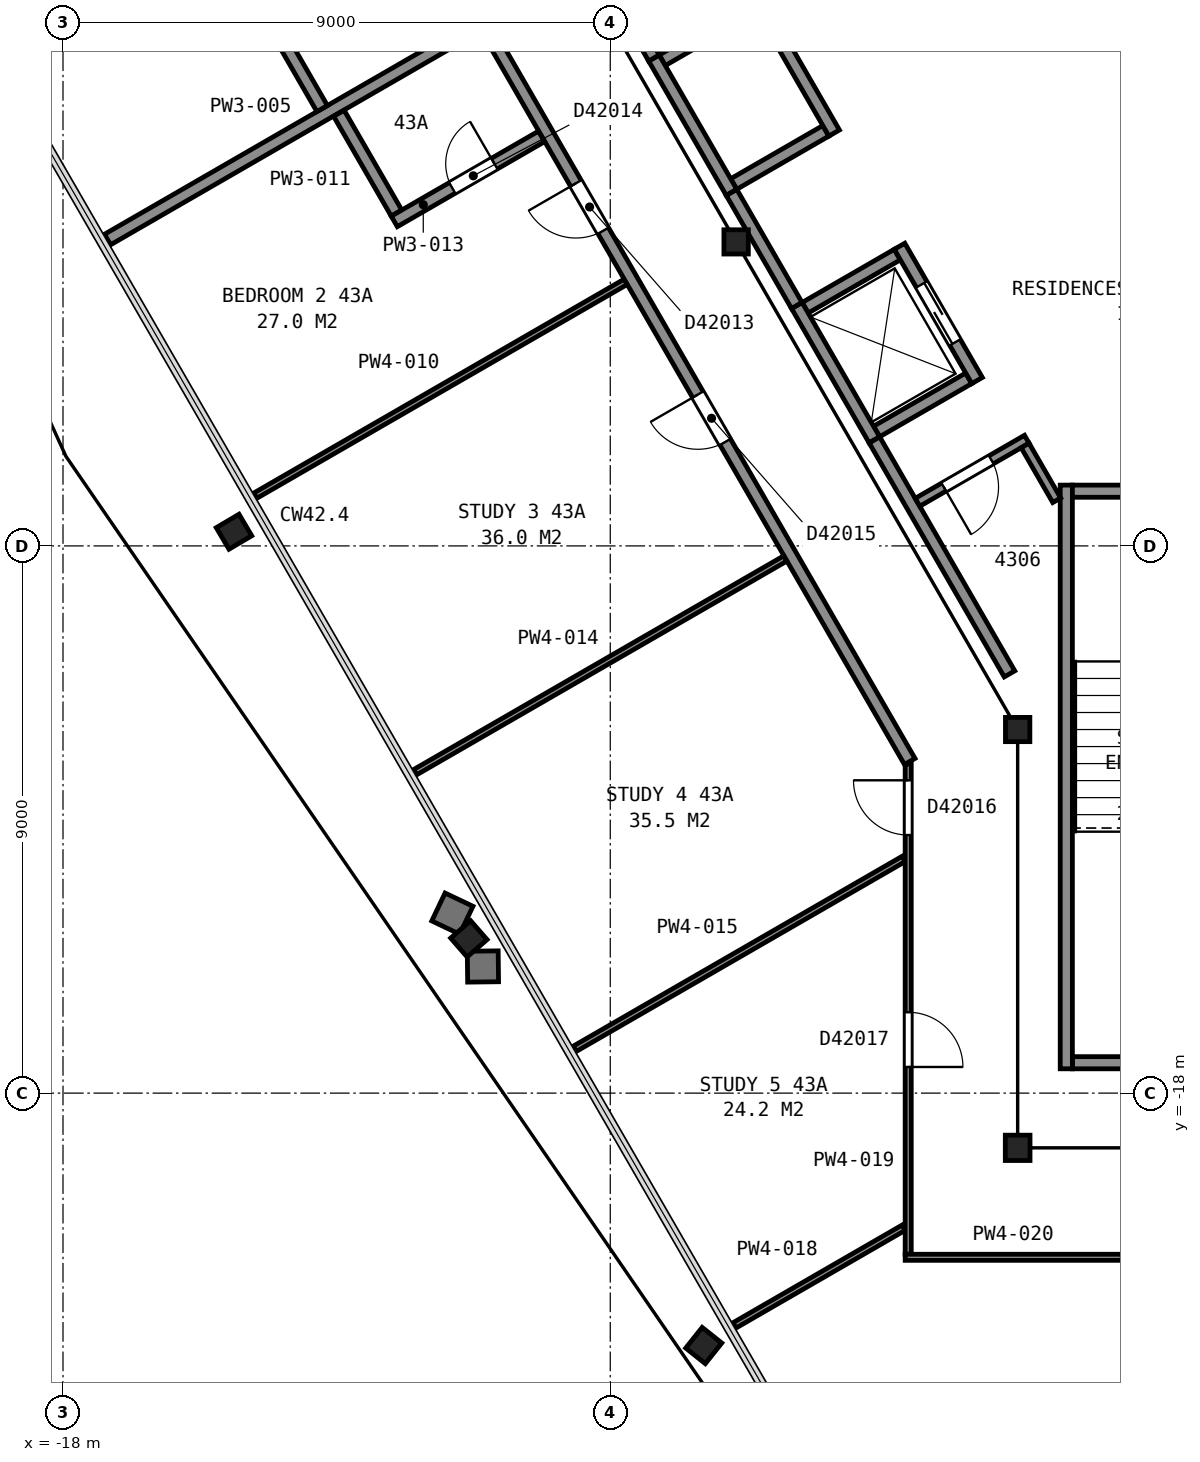
"""IFC4 building model, lengths in metres.
Left out: names, types, materials, properties, quantities, classifications, styles, units other than length and angle.
Written with IfcOpenShell. Run it as: python <this file> out.ifc"""

import sys

from ifc_helpers import new_model, si_unit, direction, frame, frame_2d, origin, origin_2d, place, context, subcontext, project, spatial, rectangle, i_section, extrude, element, fill, save


model = new_model("IFC4")
c1 = context("Model", 3, precision=1e-05, world=origin(), true_north=direction((0.0, 1.0)))
c2 = subcontext(c1, "Body", "Model", "MODEL_VIEW")
j1 = project(units=[si_unit("LENGTHUNIT", "METRE"), si_unit("PLANEANGLEUNIT", "RADIAN")], contexts=[c1])
p1 = place(None, origin())
s1 = spatial("IfcSite", under=j1, at=p1, CompositionType="ELEMENT")
p2 = place(p1, origin())
s2 = spatial("IfcBuilding", under=s1, at=p2, CompositionType="ELEMENT")
p3 = place(p2, frame((0.0, 0.0, 174.7)))
s3 = spatial("IfcBuildingStorey", under=s2, at=p3, CompositionType="ELEMENT", Elevation=174.7)
p4 = place(p3, frame((-14.996, -8.653, 0.035), z_axis=(-0.16191056894, -0.095587349349, 0.982164968989), x_axis=(-0.50013253787, 0.865946936972, 0.001829457054)))
e1 = element("IfcColumn", 1, at=p4, inside=s3, PredefinedType="COLUMN", context=c2, shape_type="SweptSolid", body=[
    extrude(i_section(OverallWidth=0.411, OverallDepth=0.434, WebThickness=0.036, FlangeThickness=0.057, FilletRadius=0.015, at=origin_2d()), origin(), (0.0, 0.0, 1.0), 3.696),
])
p5 = place(p3, frame((-11.155, -15.314, 0.035), z_axis=(-0.143292975225, -0.124737525438, 0.981787997991), x_axis=(-0.499725907096, 0.865392394927, 0.037013789052)))
e2 = element("IfcColumn", 2, at=p5, inside=s3, PredefinedType="COLUMN", context=c2, shape_type="SweptSolid", body=[
    extrude(i_section(OverallWidth=0.411, OverallDepth=0.434, WebThickness=0.036, FlangeThickness=0.057, FilletRadius=0.015, at=origin_2d()), origin(), (0.0, 0.0, 1.0), 3.697),
])
p6 = place(p3, frame((-7.315, -21.966, 0.04), z_axis=(-0.124429833743, -0.156280699311, 0.979843640331), x_axis=(-0.498834724262, 0.86349979086, 0.074377611249)))
e3 = element("IfcColumn", 3, at=p6, inside=s3, PredefinedType="COLUMN", context=c2, shape_type="SweptSolid", body=[
    extrude(i_section(OverallWidth=0.411, OverallDepth=0.434, WebThickness=0.036, FlangeThickness=0.057, FilletRadius=0.015, at=origin_2d()), origin(), (0.0, 0.0, 1.0), 3.695),
])
for number, where, z_axis, x_axis in (
    (4, (-6.93, -4.0, 0.0), (0.0, 0.0, 1.0), (1.0, 0.0, 0.0)),
    (5, (-2.3, -12.02, 0.0), (0.0, 0.0, 1.0), (1.0, 0.0, 0.0)),
):
    element("IfcColumn", number, at=place(p3, frame(where, z_axis=z_axis, x_axis=x_axis)), inside=s3, PredefinedType="COLUMN", context=c2, shape_type="SweptSolid", body=[
        extrude(i_section(OverallWidth=0.401, OverallDepth=0.399, WebThickness=0.025, FlangeThickness=0.04, FilletRadius=0.015, at=origin_2d()), origin(), (0.0, 0.0, 1.0), 3.7),
    ])
p7 = place(p3, frame((-2.3, -18.9, 0.0), z_axis=(0.0, 0.0, 1.0), x_axis=(-1.0, 0.0, 0.0)))
e6 = element("IfcColumn", 6, at=p7, inside=s3, PredefinedType="COLUMN", context=c2, shape_type="SweptSolid", body=[
    extrude(i_section(OverallWidth=0.406, OverallDepth=0.417, WebThickness=0.03, FlangeThickness=0.048, FilletRadius=0.015, at=origin_2d()), origin(), (0.0, 0.0, 1.0), 3.7),
])
p8 = place(p3, frame((-1.4, -17.5, 0.0), z_axis=(0.0, 0.0, 1.0), x_axis=(1.0, 0.0, 0.0)))
e7 = element("IfcWall", 7, at=p8, inside=s3, PredefinedType="PARTITIONING", context=c2, shape_type="SweptSolid", body=[
    extrude(rectangle(XDim=2.8, YDim=0.2, at=frame_2d((1.4, 0.0))), origin(), (0.0, 0.0, 1.0), 3.45),
])
p9 = place(p8, frame((0.85, 0.0, 0.0)))
e8 = element("IfcOpeningElement", 8, at=p9, cuts=e7, PredefinedType="OPENING", context=c2, shape_type="SweptSolid", body=[
    extrude(rectangle(XDim=1.1, YDim=2.1, at=frame_2d((0.55, 1.05))), frame((0.0, 0.11, 0.0), z_axis=(0.0, -1.0, 0.0), x_axis=(1.0, 0.0, 0.0)), (0.0, 0.0, 1.0), 0.22),
])
p10 = place(p3, frame((-1.5, -8.0, 0.0), z_axis=(0.0, 0.0, 1.0), x_axis=(0.0, -1.0, 0.0)))
e9 = element("IfcWall", 9, at=p10, inside=s3, PredefinedType="PARTITIONING", context=c2, shape_type="SweptSolid", body=[
    extrude(rectangle(XDim=9.6, YDim=0.2, at=frame_2d((4.8, 0.0))), origin(), (0.0, 0.0, 1.0), 3.45),
])
p11 = place(p3, frame((-1.4, -8.1, 0.0), z_axis=(0.0, 0.0, 1.0), x_axis=(1.0, 0.0, 0.0)))
e10 = element("IfcWall", 10, at=p11, inside=s3, PredefinedType="PARTITIONING", context=c2, shape_type="SweptSolid", body=[
    extrude(rectangle(XDim=2.8, YDim=0.2, at=frame_2d((1.4, 0.0))), origin(), (0.0, 0.0, 1.0), 3.45),
])
for number, where, z_axis, x_axis in (
    (11, (-4.62, -7.118, 0.0), (0.0, 0.0, 1.0), (0.866, 0.5, 0.0)),
    (12, (-5.795, -5.083, 0.0), (0.0, 0.0, 1.0), (0.866, 0.5, 0.0)),
    (13, (-6.97, -3.048, 0.0), (0.0, 0.0, 1.0), (0.866, 0.5, 0.0)),
):
    element("IfcWall", number, at=place(p3, frame(where, z_axis=z_axis, x_axis=x_axis)), inside=s3, PredefinedType="PARTITIONING", context=c2, shape_type="SweptSolid", body=[
        extrude(rectangle(XDim=1.75, YDim=0.2, at=frame_2d((0.875, 0.0))), origin(), (0.0, 0.0, 1.0), 3.7),
    ])
p12 = place(p3, frame((-8.145, -1.013, 0.0), z_axis=(0.0, 0.0, 1.0), x_axis=(0.866016494683, 0.500015430699, 0.0)))
e14 = element("IfcWall", 14, at=p12, inside=s3, PredefinedType="PARTITIONING", context=c2, shape_type="SweptSolid", body=[
    extrude(rectangle(XDim=3.15, YDim=0.2, at=frame_2d((1.575, 0.0))), origin(), (0.0, 0.0, 1.0), 3.7),
])
p13 = place(p3, frame((-2.968, -6.28, 0.0), z_axis=(0.0, 0.0, 1.0), x_axis=(-0.499990435942, 0.866030925526, 0.0)))
e15 = element("IfcWall", 15, at=p13, inside=s3, PredefinedType="PARTITIONING", context=c2, shape_type="SweptSolid", body=[
    extrude(rectangle(XDim=2.55, YDim=0.2, at=frame_2d((1.275, 0.0))), origin(), (0.0, 0.0, 1.0), 3.7),
])
p14 = place(p13, frame((0.725, 0.0, 0.0)))
e16 = element("IfcOpeningElement", 16, at=p14, cuts=e15, PredefinedType="OPENING", context=c2, shape_type="SweptSolid", body=[
    extrude(rectangle(XDim=1.1, YDim=2.1, at=frame_2d((0.55, 1.05))), frame((0.0, 0.11, 0.0), z_axis=(0.0, -1.0, 0.0), x_axis=(1.0, 0.0, 0.0)), (0.0, 0.0, 1.0), 0.22),
])
p15 = place(p3, frame((-5.318, -2.21, 0.0), z_axis=(0.0, 0.0, 1.0), x_axis=(-0.499938297808, 0.866061024631, 0.0)))
e17 = element("IfcWall", 17, at=p15, inside=s3, PredefinedType="PARTITIONING", context=c2, shape_type="SweptSolid", body=[
    extrude(rectangle(XDim=2.35, YDim=0.2, at=frame_2d((1.175, 0.0))), origin(), (0.0, 0.0, 1.0), 3.7),
])
for number, where, z_axis, x_axis in (
    (18, (-4.656, -7.255, 0.0), (0.0, 0.0, 1.0), (-0.5, 0.866, 0.0)),
    (19, (-7.006, -3.185, 0.0), (0.0, 0.0, 1.0), (-0.5, 0.866, 0.0)),
):
    element("IfcWall", number, at=place(p3, frame(where, z_axis=z_axis, x_axis=x_axis)), inside=s3, PredefinedType="PARTITIONING", context=c2, shape_type="SweptSolid", body=[
        extrude(rectangle(XDim=2.55, YDim=0.2, at=frame_2d((1.275, 0.0))), origin(), (0.0, 0.0, 1.0), 3.7),
    ])
p16 = place(p3, frame((-11.591, 4.755, 0.0), z_axis=(0.0, 0.0, 1.0), x_axis=(0.500043977787, -0.866000011708, 0.0)))
e20 = element("IfcWall", 20, at=p16, inside=s3, PredefinedType="PARTITIONING", context=c2, shape_type="SweptSolid", body=[
    extrude(rectangle(XDim=6.617, YDim=0.2, at=frame_2d((3.308, 0.0))), origin(), (0.0, 0.0, 1.0), 3.45),
])
p17 = place(p16, frame((3.695, 0.0, 0.0)))
e21 = element("IfcOpeningElement", 21, at=p17, cuts=e20, PredefinedType="OPENING", context=c2, shape_type="SweptSolid", body=[
    extrude(rectangle(XDim=1.8, YDim=2.1, at=frame_2d((0.9, 1.05))), frame((0.0, 0.11, 0.0), z_axis=(0.0, -1.0, 0.0), x_axis=(1.0, 0.0, 0.0)), (0.0, 0.0, 1.0), 0.22),
])
p18 = place(p3, frame((-7.005, -3.187, 0.0), z_axis=(0.0, 0.0, 1.0), x_axis=(0.499689606989, -0.866204535123, 0.0)))
e22 = element("IfcWall", 22, at=p18, inside=s3, PredefinedType="PARTITIONING", context=c2, shape_type="SweptSolid", body=[
    extrude(rectangle(XDim=2.145, YDim=0.2, at=frame_2d((1.072, 0.0))), origin(), (0.0, 0.0, 1.0), 3.45),
])
p19 = place(p3, frame((-4.655, -7.257, 0.0), z_axis=(0.0, 0.0, 1.0), x_axis=(0.499892115999, -0.866087681682, 0.0)))
e23 = element("IfcWall", 23, at=p19, inside=s3, PredefinedType="PARTITIONING", context=c2, shape_type="SweptSolid", body=[
    extrude(rectangle(XDim=4.443, YDim=0.2, at=frame_2d((2.221, 0.0))), origin(), (0.0, 0.0, 1.0), 3.45),
])
p20 = place(p3, frame((-2.15, -7.246, 0.0), z_axis=(0.0, 0.0, 1.0), x_axis=(-0.866099396229, -0.499871819421, 0.0)))
e24 = element("IfcWall", 24, at=p20, inside=s3, PredefinedType="PARTITIONING", context=c2, shape_type="SweptSolid", body=[
    extrude(rectangle(XDim=2.075, YDim=0.15, at=frame_2d((1.038, 0.0))), origin(), (0.0, 0.0, 1.0), 3.45),
])
p21 = place(p20, frame((0.675, 0.0, 0.0)))
e25 = element("IfcOpeningElement", 25, at=p21, cuts=e24, PredefinedType="OPENING", context=c2, shape_type="SweptSolid", body=[
    extrude(rectangle(XDim=0.9, YDim=2.1, at=frame_2d((0.45, 1.05))), frame((0.0, 0.085, 0.0), z_axis=(0.0, -1.0, 0.0), x_axis=(1.0, 0.0, 0.0)), (0.0, 0.0, 1.0), 0.17),
])
p22 = place(p3, frame((-2.177, -7.348, 0.0), z_axis=(0.0, 0.0, 1.0), x_axis=(0.49972245349, -0.866185586049, 0.0)))
e26 = element("IfcWall", 26, at=p22, inside=s3, PredefinedType="PARTITIONING", context=c2, shape_type="SweptSolid", body=[
    extrude(rectangle(XDim=1.041, YDim=0.15, at=frame_2d((0.52, 0.0))), origin(), (0.0, 0.0, 1.0), 3.45),
])
p23 = place(p3, frame((-17.268, -3.961, 0.0), z_axis=(0.0, 0.0, 1.0), x_axis=(0.866002795668, 0.500039156363, 0.0)))
e27 = element("IfcWall", 27, at=p23, inside=s3, PredefinedType="PARTITIONING", context=c2, shape_type="SweptSolid", body=[
    extrude(rectangle(XDim=7.029, YDim=0.2, at=frame_2d((3.514, 0.0))), origin(), (0.0, 0.0, 1.0), 2.713),
])
p24 = place(p3, frame((-14.938, 0.271, 0.0), z_axis=(0.0, 0.0, 1.0), x_axis=(0.499913221443, -0.866075499611, 0.0)))
e28 = element("IfcWall", 28, at=p24, inside=s3, PredefinedType="PARTITIONING", context=c2, shape_type="SweptSolid", body=[
    extrude(rectangle(XDim=2.4, YDim=0.2, at=frame_2d((1.2, 0.0))), origin(), (0.0, 0.0, 1.0), 2.713),
])
p25 = place(p3, frame((-14.836, -8.173, 0.0), z_axis=(0.0, 0.0, 1.0), x_axis=(0.866006381746, 0.500032945689, 0.0)))
e29 = element("IfcWall", 29, at=p25, inside=s3, PredefinedType="PARTITIONING", context=c2, shape_type="SweptSolid", body=[
    extrude(rectangle(XDim=7.033, YDim=0.1, at=frame_2d((3.517, 0.0))), origin(), (0.0, 0.0, 1.0), 2.713),
])
p26 = place(p3, frame((-13.462, -1.885, 0.0), z_axis=(0.0, 0.0, 1.0), x_axis=(0.499949193323, -0.866054735046, 0.0)))
e30 = element("IfcWall", 30, at=p26, inside=s3, PredefinedType="PARTITIONING", context=c2, shape_type="SweptSolid", body=[
    extrude(rectangle(XDim=1.895, YDim=0.2, at=frame_2d((0.948, 0.0))), origin(), (0.0, 0.0, 1.0), 2.713),
])
p27 = place(p3, frame((-4.075, -12.545, 0.0), z_axis=(0.0, 0.0, 1.0), x_axis=(-0.499999743747, 0.866025551732, 0.0)))
e31 = element("IfcWall", 31, at=p27, inside=s3, PredefinedType="PARTITIONING", context=c2, shape_type="SweptSolid", body=[
    extrude(rectangle(XDim=17.656, YDim=0.2, at=frame_2d((8.828, 0.0))), origin(), (0.0, 0.0, 1.0), 2.713),
])
p28 = place(p27, frame((10.08, 0.0, 0.0)))
e32 = element("IfcOpeningElement", 32, at=p28, cuts=e31, PredefinedType="OPENING", context=c2, shape_type="SweptSolid", body=[
    extrude(rectangle(XDim=0.9, YDim=2.1, at=frame_2d((0.45, 1.05))), frame((0.0, 0.11, 0.0), z_axis=(0.0, -1.0, 0.0), x_axis=(1.0, 0.0, 0.0)), (0.0, 0.0, 1.0), 0.22),
])
p29 = place(p27, frame((6.068, 0.0, 0.0)))
e33 = element("IfcOpeningElement", 33, at=p29, cuts=e31, PredefinedType="OPENING", context=c2, shape_type="SweptSolid", body=[
    extrude(rectangle(XDim=0.9, YDim=2.1, at=frame_2d((0.45, 1.05))), frame((0.0, 0.11, 0.0), z_axis=(0.0, -1.0, 0.0), x_axis=(1.0, 0.0, 0.0)), (0.0, 0.0, 1.0), 0.22),
])
p30 = place(p3, frame((-12.552, -3.663, 0.0), z_axis=(0.0, 0.0, 1.0), x_axis=(0.866003766563, 0.500037474894, 0.0)))
e34 = element("IfcWall", 34, at=p30, inside=s3, PredefinedType="PARTITIONING", context=c2, shape_type="SweptSolid", body=[
    extrude(rectangle(XDim=2.795, YDim=0.2, at=frame_2d((1.397, 0.0))), origin(), (0.0, 0.0, 1.0), 2.713),
])
p31 = place(p30, frame((1.1, 0.0, 0.0)))
e35 = element("IfcOpeningElement", 35, at=p31, cuts=e34, PredefinedType="OPENING", context=c2, shape_type="SweptSolid", body=[
    extrude(rectangle(XDim=0.8, YDim=2.1, at=frame_2d((0.4, 1.05))), frame((0.0, 0.11, 0.0), z_axis=(0.0, -1.0, 0.0), x_axis=(1.0, 0.0, 0.0)), (0.0, 0.0, 1.0), 0.22),
])
p32 = place(p3, frame((-12.21, -12.722, 0.0), z_axis=(0.0, 0.0, 1.0), x_axis=(0.866002795668, 0.500039156363, 0.0)))
e36 = element("IfcWall", 36, at=p32, inside=s3, PredefinedType="PARTITIONING", context=c2, shape_type="SweptSolid", body=[
    extrude(rectangle(XDim=7.029, YDim=0.1, at=frame_2d((3.514, 0.0))), origin(), (0.0, 0.0, 1.0), 2.713),
])
p33 = place(p3, frame((-9.584, -17.271, 0.0), z_axis=(0.0, 0.0, 1.0), x_axis=(0.866018935351, 0.500011203488, 0.0)))
e37 = element("IfcWall", 37, at=p33, inside=s3, PredefinedType="PARTITIONING", context=c2, shape_type="SweptSolid", body=[
    extrude(rectangle(XDim=6.245, YDim=0.1, at=frame_2d((3.123, 0.0))), origin(), (0.0, 0.0, 1.0), 2.713),
])
p34 = place(p3, frame((-6.958, -21.82, 0.0), z_axis=(0.0, 0.0, 1.0), x_axis=(0.86602741148, 0.499996522553, 0.0)))
e38 = element("IfcWall", 38, at=p34, inside=s3, PredefinedType="PARTITIONING", context=c2, shape_type="SweptSolid", body=[
    extrude(rectangle(XDim=3.213, YDim=0.1, at=frame_2d((1.606, 0.0))), origin(), (0.0, 0.0, 1.0), 2.713),
])
p35 = place(p3, frame((-4.1, -20.65, 0.0), z_axis=(0.0, 0.0, 1.0), x_axis=(0.0, 1.0, 0.0)))
e39 = element("IfcWall", 39, at=p35, inside=s3, PredefinedType="PARTITIONING", context=c2, shape_type="SweptSolid", body=[
    extrude(rectangle(XDim=8.063, YDim=0.1, at=frame_2d((4.031, 0.0))), origin(), (0.0, 0.0, 1.0), 2.713),
])
p36 = place(p35, frame((6.895, 0.0, 0.0)))
e40 = element("IfcOpeningElement", 40, at=p36, cuts=e39, PredefinedType="OPENING", context=c2, shape_type="SweptSolid", body=[
    extrude(rectangle(XDim=0.9, YDim=2.1, at=frame_2d((0.45, 1.05))), frame((0.0, 0.06, 0.0), z_axis=(0.0, -1.0, 0.0), x_axis=(1.0, 0.0, 0.0)), (0.0, 0.0, 1.0), 0.12),
])
p37 = place(p35, frame((3.08, 0.0, 0.0)))
e41 = element("IfcOpeningElement", 41, at=p37, cuts=e39, PredefinedType="OPENING", context=c2, shape_type="SweptSolid", body=[
    extrude(rectangle(XDim=0.9, YDim=2.1, at=frame_2d((0.45, 1.05))), frame((0.0, 0.06, 0.0), z_axis=(0.0, -1.0, 0.0), x_axis=(1.0, 0.0, 0.0)), (0.0, 0.0, 1.0), 0.12),
])
p38 = place(p3, frame((4.1, -20.7, 0.0), z_axis=(0.0, 0.0, 1.0), x_axis=(-1.0, 0.0, 0.0)))
e42 = element("IfcWall", 42, at=p38, inside=s3, PredefinedType="PARTITIONING", context=c2, shape_type="SweptSolid", body=[
    extrude(rectangle(XDim=8.25, YDim=0.1, at=frame_2d((4.125, 0.0))), origin(), (0.0, 0.0, 1.0), 2.713),
])
p39 = place(p38, frame((3.5, 0.0, 0.0)))
e43 = element("IfcOpeningElement", 43, at=p39, cuts=e42, PredefinedType="OPENING", context=c2, shape_type="SweptSolid", body=[
    extrude(rectangle(XDim=1.2, YDim=2.1, at=frame_2d((0.6, 1.05))), frame((0.0, 0.06, 0.0), z_axis=(0.0, -1.0, 0.0), x_axis=(1.0, 0.0, 0.0)), (0.0, 0.0, 1.0), 0.12),
])
p40 = place(p14, origin())
e44 = element("IfcDoor", 44, at=p40, inside=s3, OperationType="SLIDING_TO_RIGHT", PredefinedType="DOOR", context=c2, shape_type="SweptSolid", body=[
    extrude(rectangle(XDim=1.1, YDim=2.1, at=frame_2d((0.55, 1.05))), frame((0.0, 0.025, 0.0), z_axis=(0.0, -1.0, 0.0), x_axis=(1.0, 0.0, 0.0)), (0.0, 0.0, 1.0), 0.05),
])
fill(e16, e44)
p41 = place(p21, origin())
e45 = element("IfcDoor", 45, at=p41, inside=s3, OperationType="SINGLE_SWING_RIGHT", PredefinedType="DOOR", context=c2, shape_type="SweptSolid", body=[
    extrude(rectangle(XDim=0.9, YDim=2.1, at=frame_2d((0.45, 1.05))), frame((0.0, 0.025, 0.0), z_axis=(0.0, -1.0, 0.0), x_axis=(1.0, 0.0, 0.0)), (0.0, 0.0, 1.0), 0.05),
])
fill(e25, e45)
p42 = place(p28, origin())
e46 = element("IfcDoor", 46, at=p42, inside=s3, OperationType="SINGLE_SWING_RIGHT", PredefinedType="DOOR", context=c2, shape_type="SweptSolid", body=[
    extrude(rectangle(XDim=0.9, YDim=2.1, at=frame_2d((0.45, 1.05))), frame((0.0, 0.025, 0.0), z_axis=(0.0, -1.0, 0.0), x_axis=(1.0, 0.0, 0.0)), (0.0, 0.0, 1.0), 0.05),
])
fill(e32, e46)
p43 = place(p29, origin())
e47 = element("IfcDoor", 47, at=p43, inside=s3, OperationType="SINGLE_SWING_RIGHT", PredefinedType="DOOR", context=c2, shape_type="SweptSolid", body=[
    extrude(rectangle(XDim=0.9, YDim=2.1, at=frame_2d((0.45, 1.05))), frame((0.0, 0.025, 0.0), z_axis=(0.0, -1.0, 0.0), x_axis=(1.0, 0.0, 0.0)), (0.0, 0.0, 1.0), 0.05),
])
fill(e33, e47)
p44 = place(p31, origin())
e48 = element("IfcDoor", 48, at=p44, inside=s3, OperationType="SINGLE_SWING_RIGHT", PredefinedType="DOOR", context=c2, shape_type="SweptSolid", body=[
    extrude(rectangle(XDim=0.8, YDim=2.1, at=frame_2d((0.4, 1.05))), frame((0.0, 0.025, 0.0), z_axis=(0.0, -1.0, 0.0), x_axis=(1.0, 0.0, 0.0)), (0.0, 0.0, 1.0), 0.05),
])
fill(e35, e48)
p45 = place(p36, origin())
e49 = element("IfcDoor", 49, at=p45, inside=s3, OperationType="SINGLE_SWING_RIGHT", PredefinedType="DOOR", context=c2, shape_type="SweptSolid", body=[
    extrude(rectangle(XDim=0.9, YDim=2.1, at=frame_2d((0.45, 1.05))), frame((0.0, 0.025, 0.0), z_axis=(0.0, -1.0, 0.0), x_axis=(1.0, 0.0, 0.0)), (0.0, 0.0, 1.0), 0.05),
])
fill(e40, e49)
p46 = place(p37, origin())
e50 = element("IfcDoor", 50, at=p46, inside=s3, OperationType="SINGLE_SWING_LEFT", PredefinedType="DOOR", context=c2, shape_type="SweptSolid", body=[
    extrude(rectangle(XDim=0.9, YDim=2.1, at=frame_2d((0.45, 1.05))), frame((0.0, 0.025, 0.0), z_axis=(0.0, -1.0, 0.0), x_axis=(1.0, 0.0, 0.0)), (0.0, 0.0, 1.0), 0.05),
])
fill(e41, e50)
p47 = place(p39, origin())
e51 = element("IfcDoor", 51, at=p47, inside=s3, OperationType="SINGLE_SWING_LEFT", PredefinedType="DOOR", context=c2, shape_type="SweptSolid", body=[
    extrude(rectangle(XDim=1.2, YDim=2.1, at=frame_2d((0.6, 1.05))), frame((0.0, 0.025, 0.0), z_axis=(0.0, -1.0, 0.0), x_axis=(1.0, 0.0, 0.0)), (0.0, 0.0, 1.0), 0.05),
])
fill(e43, e51)
save(model, sys.argv[1])
